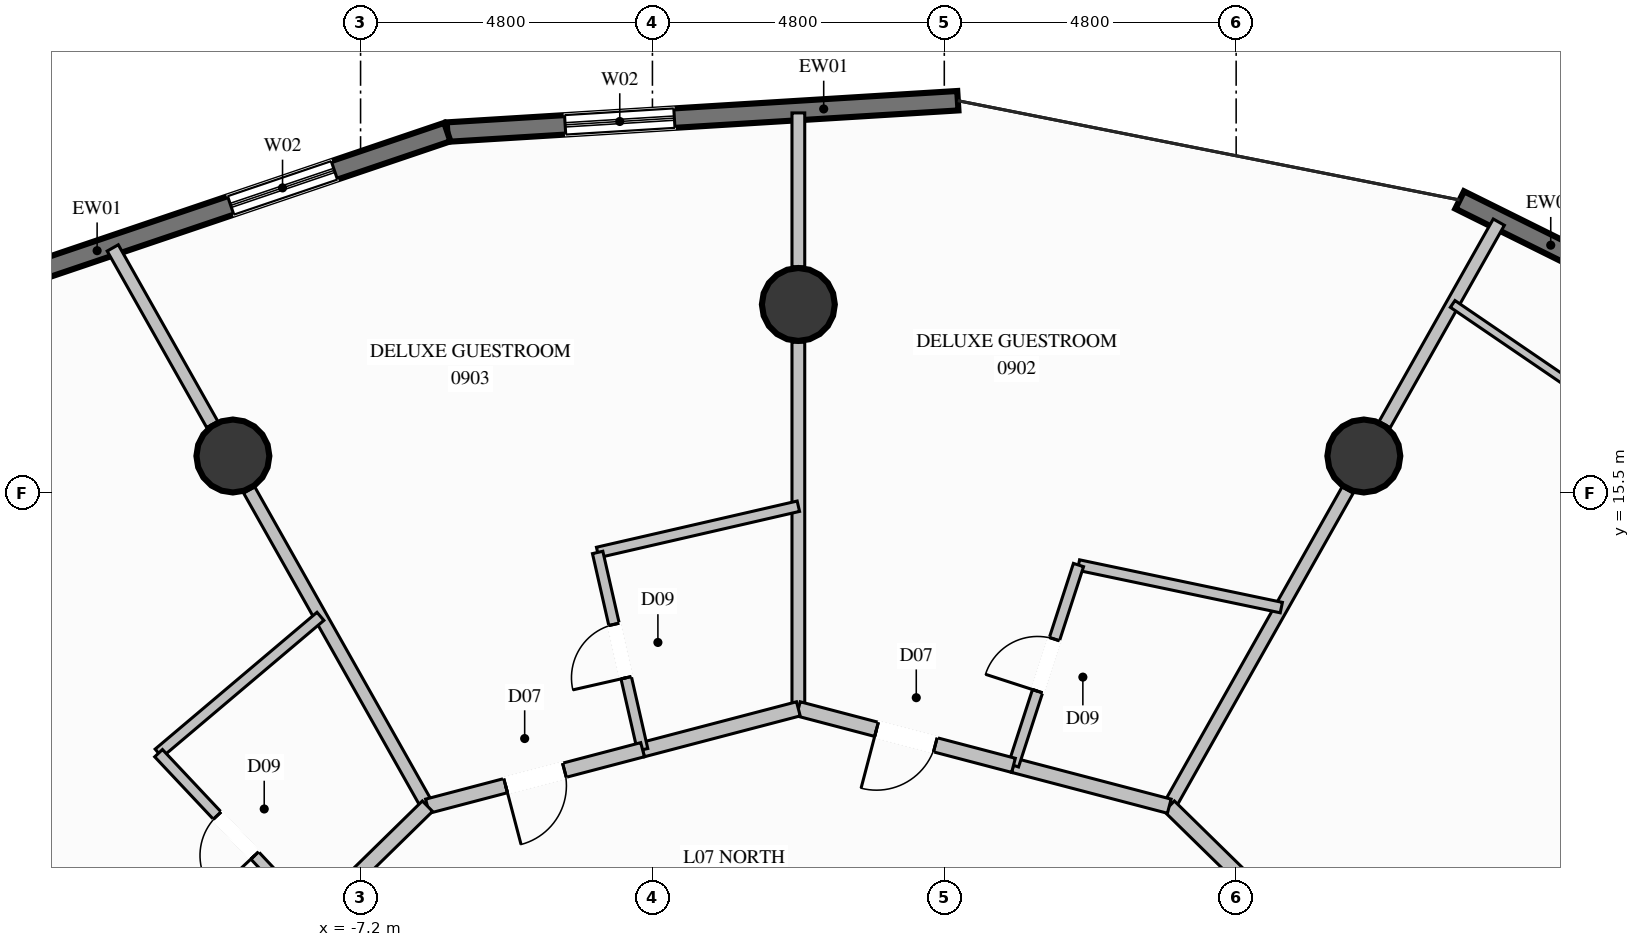
"""IFC4 building model, lengths in metres.
Left out: names, types, materials, properties, quantities, classifications, styles, units other than length and angle.
Written with IfcOpenShell. Run it as: python <this file> out.ifc"""

import sys

from ifc_helpers import new_model, si_unit, direction, frame, frame_2d, origin, origin_2d, place, context, subcontext, project, spatial, rectangle, circle, extrude, element, fill, save


model = new_model("IFC4")
c1 = context("Model", 3, precision=1e-05, world=origin(), true_north=direction((0.0, 1.0)))
c2 = subcontext(c1, "Body", "Model", "MODEL_VIEW")
j1 = project(units=[si_unit("LENGTHUNIT", "METRE"), si_unit("PLANEANGLEUNIT", "RADIAN")], contexts=[c1])
p1 = place(None, origin())
s1 = spatial("IfcSite", under=j1, at=p1, CompositionType="ELEMENT")
p2 = place(p1, origin())
s2 = spatial("IfcBuilding", under=s1, at=p2, CompositionType="ELEMENT")
p3 = place(p2, frame((0.0, 0.0, 35.6)))
s3 = spatial("IfcBuildingStorey", under=s2, at=p3, CompositionType="ELEMENT", Elevation=35.6)
for number, where, z_axis, x_axis in (
    (1, (9.3, 16.108, 0.0), (0.0, 0.0, 1.0), (1.0, 0.0, 0.0)),
    (2, (0.0, 18.6, 0.0), (0.0, 0.0, 1.0), (1.0, 0.0, 0.0)),
    (3, (-9.3, 16.108, 0.0), (0.0, 0.0, 1.0), (1.0, 0.0, 0.0)),
):
    element("IfcColumn", number, at=place(p3, frame(where, z_axis=z_axis, x_axis=x_axis)), inside=s3, PredefinedType="COLUMN", context=c2, shape_type="SweptSolid", body=[
        extrude(circle(Radius=0.6, at=origin_2d()), origin(), (0.0, 0.0, 1.0), 3.6),
    ])
p4 = place(p3, frame((10.876, 20.318, 0.0), z_axis=(0.0, 0.0, 1.0), x_axis=(0.895818759339, -0.444419565743, 0.0)))
e4 = element("IfcWall", 4, at=p4, inside=s3, PredefinedType="SOLIDWALL", context=c2, shape_type="SweptSolid", body=[
    extrude(rectangle(XDim=8.15, YDim=0.32, at=frame_2d((4.075, 0.0))), origin(), (0.0, 0.0, 1.0), 3.34),
])
p5 = place(p4, frame((3.594, 0.0, 0.35)))
e5 = element("IfcOpeningElement", 5, at=p5, cuts=e4, PredefinedType="OPENING", context=c2, shape_type="SweptSolid", body=[
    extrude(rectangle(XDim=1.8, YDim=2.6, at=frame_2d((0.9, 1.3))), frame((0.0, 0.17, 0.0), z_axis=(0.0, -1.0, 0.0), x_axis=(1.0, 0.0, 0.0)), (0.0, 0.0, 1.0), 0.34),
])
p6 = place(p3, frame((-5.773, 21.435, 0.0), z_axis=(0.0, 0.0, 1.0), x_axis=(0.998117750792, 0.06132663005, 0.0)))
e6 = element("IfcWall", 6, at=p6, inside=s3, PredefinedType="SOLIDWALL", context=c2, shape_type="SweptSolid", body=[
    extrude(rectangle(XDim=8.412, YDim=0.32, at=frame_2d((4.206, 0.0))), origin(), (0.0, 0.0, 1.0), 3.34),
])
p7 = place(p6, frame((1.941, 0.0, 0.35)))
e7 = element("IfcOpeningElement", 7, at=p7, cuts=e6, PredefinedType="OPENING", context=c2, shape_type="SweptSolid", body=[
    extrude(rectangle(XDim=1.8, YDim=2.6, at=frame_2d((0.9, 1.3))), frame((0.0, 0.17, 0.0), z_axis=(0.0, -1.0, 0.0), x_axis=(1.0, 0.0, 0.0)), (0.0, 0.0, 1.0), 0.34),
])
p8 = place(p3, frame((-13.493, 18.821, 0.0), z_axis=(0.0, 0.0, 1.0), x_axis=(0.94717495877, 0.320717317085, 0.0)))
e8 = element("IfcWall", 8, at=p8, inside=s3, PredefinedType="SOLIDWALL", context=c2, shape_type="SweptSolid", body=[
    extrude(rectangle(XDim=8.151, YDim=0.32, at=frame_2d((4.075, 0.0))), origin(), (0.0, 0.0, 1.0), 3.34),
])
p9 = place(p8, frame((4.389, 0.0, 0.35)))
e9 = element("IfcOpeningElement", 9, at=p9, cuts=e8, PredefinedType="OPENING", context=c2, shape_type="SweptSolid", body=[
    extrude(rectangle(XDim=1.8, YDim=2.6, at=frame_2d((0.9, 1.3))), frame((0.0, 0.17, 0.0), z_axis=(0.0, -1.0, 0.0), x_axis=(1.0, 0.0, 0.0)), (0.0, 0.0, 1.0), 0.34),
])
p10 = place(p3, frame((6.1, 10.349, 0.0), z_axis=(0.0, 0.0, 1.0), x_axis=(0.491458802648, 0.870900824032, 0.0)))
e10 = element("IfcWall", 10, at=p10, inside=s3, PredefinedType="PARTITIONING", context=c2, shape_type="SweptSolid", body=[
    extrude(rectangle(XDim=5.97, YDim=0.21, at=frame_2d((2.985, 0.0))), origin(), (0.0, 0.0, 1.0), 2.707),
])
p11 = place(p3, frame((9.642, 16.625, 0.0), z_axis=(0.0, 0.0, 1.0), x_axis=(0.491316217202, 0.870981271161, 0.0)))
e11 = element("IfcWall", 11, at=p11, inside=s3, PredefinedType="PARTITIONING", context=c2, shape_type="SweptSolid", body=[
    extrude(rectangle(XDim=3.822, YDim=0.21, at=frame_2d((1.911, 0.0))), origin(), (0.0, 0.0, 1.0), 3.34),
])
p12 = place(p3, frame((0.0, 11.95, 0.0), z_axis=(0.0, 0.0, 1.0), x_axis=(0.0, 1.0, 0.0)))
e12 = element("IfcWall", 12, at=p12, inside=s3, PredefinedType="PARTITIONING", context=c2, shape_type="SweptSolid", body=[
    extrude(rectangle(XDim=6.03, YDim=0.21, at=frame_2d((3.015, 0.0))), origin(), (0.0, 0.0, 1.0), 2.707),
])
p13 = place(p3, frame((0.0, 19.22, 0.0), z_axis=(0.0, 0.0, 1.0), x_axis=(0.0, 1.0, 0.0)))
e13 = element("IfcWall", 13, at=p13, inside=s3, PredefinedType="PARTITIONING", context=c2, shape_type="SweptSolid", body=[
    extrude(rectangle(XDim=2.53, YDim=0.21, at=frame_2d((1.265, 0.0))), origin(), (0.0, 0.0, 1.0), 3.34),
])
p14 = place(p3, frame((-6.1, 10.349, 0.0), z_axis=(0.0, 0.0, 1.0), x_axis=(-0.491140594116, 0.871080315936, 0.0)))
e14 = element("IfcWall", 14, at=p14, inside=s3, PredefinedType="PARTITIONING", context=c2, shape_type="SweptSolid", body=[
    extrude(rectangle(XDim=5.969, YDim=0.21, at=frame_2d((2.985, 0.0))), origin(), (0.0, 0.0, 1.0), 2.707),
])
p15 = place(p3, frame((-9.639, 16.627, 0.0), z_axis=(0.0, 0.0, 1.0), x_axis=(-0.491168715891, 0.871064459457, 0.0)))
e15 = element("IfcWall", 15, at=p15, inside=s3, PredefinedType="PARTITIONING", context=c2, shape_type="SweptSolid", body=[
    extrude(rectangle(XDim=3.333, YDim=0.21, at=frame_2d((1.667, 0.0))), origin(), (0.0, 0.0, 1.0), 3.34),
])
p16 = place(p3, frame((10.566, 5.975, 0.0), z_axis=(0.0, 0.0, 1.0), x_axis=(-0.714411174131, 0.699726142342, 0.0)))
e16 = element("IfcWall", 16, at=p16, inside=s3, PredefinedType="PARTITIONING", context=c2, shape_type="SweptSolid", body=[
    extrude(rectangle(XDim=6.251, YDim=0.24, at=frame_2d((3.125, 0.0))), origin(), (0.0, 0.0, 1.0), 3.34),
])
p17 = place(p3, frame((20.613, 11.883, 0.0), z_axis=(0.0, 0.0, 1.0), x_axis=(-0.825894658533, 0.563824452295, 0.0)))
e17 = element("IfcWall", 17, at=p17, inside=s3, PredefinedType="PARTITIONING", context=c2, shape_type="SweptSolid", body=[
    extrude(rectangle(XDim=11.929, YDim=0.135, at=frame_2d((5.964, 0.0))), origin(), (0.0, 0.0, 1.0), 3.34),
])
p18 = place(p17, frame((5.489, 0.0, 0.0)))
e18 = element("IfcOpeningElement", 18, at=p18, cuts=e17, PredefinedType="OPENING", context=c2, shape_type="SweptSolid", body=[
    extrude(rectangle(XDim=0.95, YDim=2.1, at=frame_2d((0.475, 1.05))), frame((0.0, 0.078, 0.0), z_axis=(0.0, -1.0, 0.0), x_axis=(1.0, 0.0, 0.0)), (0.0, 0.0, 1.0), 0.155),
])
p19 = place(p3, frame((6.1, 10.349, 0.0), z_axis=(0.0, 0.0, 1.0), x_axis=(-0.967291490053, 0.253667446219, 0.0)))
e19 = element("IfcWall", 19, at=p19, inside=s3, PredefinedType="PARTITIONING", context=c2, shape_type="SweptSolid", body=[
    extrude(rectangle(XDim=2.649, YDim=0.24, at=frame_2d((1.324, 0.0))), origin(), (0.0, 0.0, 1.0), 3.34),
])
p20 = place(p3, frame((7.943, 13.615, 0.0), z_axis=(0.0, 0.0, 1.0), x_axis=(-0.978691652986, 0.205335453283, 0.0)))
e20 = element("IfcWall", 20, at=p20, inside=s3, PredefinedType="PLUMBINGWALL", context=c2, shape_type="SweptSolid", body=[
    extrude(rectangle(XDim=3.409, YDim=0.175, at=frame_2d((1.705, 0.0))), origin(), (0.0, 0.0, 1.0), 3.34),
])
p21 = place(p3, frame((3.538, 11.021, 0.0), z_axis=(0.0, 0.0, 1.0), x_axis=(0.308646066056, 0.951176958251, 0.0)))
e21 = element("IfcWall", 21, at=p21, inside=s3, PredefinedType="PLUMBINGWALL", context=c2, shape_type="SweptSolid", body=[
    extrude(rectangle(XDim=3.463, YDim=0.175, at=frame_2d((1.731, 0.0))), origin(), (0.0, 0.0, 1.0), 3.34),
])
p22 = place(p21, frame((1.282, 0.0, 0.0)))
e22 = element("IfcOpeningElement", 22, at=p22, cuts=e21, PredefinedType="OPENING", context=c2, shape_type="SweptSolid", body=[
    extrude(rectangle(XDim=0.9, YDim=2.1, at=frame_2d((0.45, 1.05))), frame((0.0, 0.098, 0.0), z_axis=(0.0, -1.0, 0.0), x_axis=(1.0, 0.0, 0.0)), (0.0, 0.0, 1.0), 0.195),
])
p23 = place(p3, frame((3.538, 11.021, 0.0), z_axis=(0.0, 0.0, 1.0), x_axis=(-0.96721703222, 0.253951201187, 0.0)))
e23 = element("IfcWall", 23, at=p23, inside=s3, PredefinedType="PARTITIONING", context=c2, shape_type="SweptSolid", body=[
    extrude(rectangle(XDim=3.658, YDim=0.24, at=frame_2d((1.829, 0.0))), origin(), (0.0, 0.0, 1.0), 2.917),
])
p24 = place(p23, frame((1.329, 0.0, 0.0)))
e24 = element("IfcOpeningElement", 24, at=p24, cuts=e23, PredefinedType="OPENING", context=c2, shape_type="SweptSolid", body=[
    extrude(rectangle(XDim=1.0, YDim=2.2, at=frame_2d((0.5, 1.1))), frame((0.0, 0.13, 0.0), z_axis=(0.0, -1.0, 0.0), x_axis=(1.0, 0.0, 0.0)), (0.0, 0.0, 1.0), 0.26),
])
p25 = place(p3, frame((0.0, 11.95, 0.0), z_axis=(0.0, 0.0, 1.0), x_axis=(-0.967291490053, -0.253667446219, 0.0)))
e25 = element("IfcWall", 25, at=p25, inside=s3, PredefinedType="PARTITIONING", context=c2, shape_type="SweptSolid", body=[
    extrude(rectangle(XDim=2.649, YDim=0.24, at=frame_2d((1.324, 0.0))), origin(), (0.0, 0.0, 1.0), 2.917),
])
p26 = place(p3, frame((0.0, 15.282, 0.0), z_axis=(0.0, 0.0, 1.0), x_axis=(-0.974505253862, -0.224364681257, 0.0)))
e26 = element("IfcWall", 26, at=p26, inside=s3, PredefinedType="PLUMBINGWALL", context=c2, shape_type="SweptSolid", body=[
    extrude(rectangle(XDim=3.387, YDim=0.175, at=frame_2d((1.694, 0.0))), origin(), (0.0, 0.0, 1.0), 3.34),
])
p27 = place(p3, frame((-2.562, 11.278, 0.0), z_axis=(0.0, 0.0, 1.0), x_axis=(-0.222125372562, 0.97501811207, 0.0)))
e27 = element("IfcWall", 27, at=p27, inside=s3, PredefinedType="PLUMBINGWALL", context=c2, shape_type="SweptSolid", body=[
    extrude(rectangle(XDim=3.327, YDim=0.175, at=frame_2d((1.664, 0.0))), origin(), (0.0, 0.0, 1.0), 3.34),
])
p28 = place(p27, frame((1.214, 0.0, 0.0)))
e28 = element("IfcOpeningElement", 28, at=p28, cuts=e27, PredefinedType="OPENING", context=c2, shape_type="SweptSolid", body=[
    extrude(rectangle(XDim=0.9, YDim=2.1, at=frame_2d((0.45, 1.05))), frame((0.0, 0.098, 0.0), z_axis=(0.0, -1.0, 0.0), x_axis=(1.0, 0.0, 0.0)), (0.0, 0.0, 1.0), 0.195),
])
p29 = place(p3, frame((-2.562, 11.278, 0.0), z_axis=(0.0, 0.0, 1.0), x_axis=(-0.96721703222, -0.253951201187, 0.0)))
e29 = element("IfcWall", 29, at=p29, inside=s3, PredefinedType="PARTITIONING", context=c2, shape_type="SweptSolid", body=[
    extrude(rectangle(XDim=3.658, YDim=0.24, at=frame_2d((1.829, 0.0))), origin(), (0.0, 0.0, 1.0), 2.917),
])
p30 = place(p29, frame((1.329, 0.0, 0.0)))
e30 = element("IfcOpeningElement", 30, at=p30, cuts=e29, PredefinedType="OPENING", context=c2, shape_type="SweptSolid", body=[
    extrude(rectangle(XDim=1.0, YDim=2.2, at=frame_2d((0.5, 1.1))), frame((0.0, 0.13, 0.0), z_axis=(0.0, -1.0, 0.0), x_axis=(1.0, 0.0, 0.0)), (0.0, 0.0, 1.0), 0.26),
])
p31 = place(p3, frame((-6.1, 10.349, 0.0), z_axis=(0.0, 0.0, 1.0), x_axis=(-0.714460071513, -0.69967621527, 0.0)))
e31 = element("IfcWall", 31, at=p31, inside=s3, PredefinedType="PARTITIONING", context=c2, shape_type="SweptSolid", body=[
    extrude(rectangle(XDim=2.626, YDim=0.24, at=frame_2d((1.313, 0.0))), origin(), (0.0, 0.0, 1.0), 3.34),
])
p32 = place(p3, frame((-7.86, 13.471, 0.0), z_axis=(0.0, 0.0, 1.0), x_axis=(-0.763718302061, -0.645549653471, 0.0)))
e32 = element("IfcWall", 32, at=p32, inside=s3, PredefinedType="PLUMBINGWALL", context=c2, shape_type="SweptSolid", body=[
    extrude(rectangle(XDim=3.485, YDim=0.175, at=frame_2d((1.743, 0.0))), origin(), (0.0, 0.0, 1.0), 3.34),
])
p33 = place(p3, frame((-7.976, 8.512, 0.0), z_axis=(0.0, 0.0, 1.0), x_axis=(-0.684831906404, 0.72870107724, 0.0)))
e33 = element("IfcWall", 33, at=p33, inside=s3, PredefinedType="PLUMBINGWALL", context=c2, shape_type="SweptSolid", body=[
    extrude(rectangle(XDim=3.718, YDim=0.175, at=frame_2d((1.859, 0.0))), origin(), (0.0, 0.0, 1.0), 3.34),
])
p34 = place(p33, frame((1.409, 0.0, 0.0)))
e34 = element("IfcOpeningElement", 34, at=p34, cuts=e33, PredefinedType="OPENING", context=c2, shape_type="SweptSolid", body=[
    extrude(rectangle(XDim=0.9, YDim=2.1, at=frame_2d((0.45, 1.05))), frame((0.0, 0.098, 0.0), z_axis=(0.0, -1.0, 0.0), x_axis=(1.0, 0.0, 0.0)), (0.0, 0.0, 1.0), 0.195),
])
p35 = place(p7, origin())
e35 = element("IfcWindow", 35, at=p35, inside=s3, PartitioningType="SINGLE_PANEL", PredefinedType="WINDOW", context=c2, shape_type="SweptSolid", body=[
    extrude(rectangle(XDim=1.8, YDim=2.6, at=frame_2d((0.9, 1.3))), frame((0.0, 0.03, 0.0), z_axis=(0.0, -1.0, 0.0), x_axis=(1.0, 0.0, 0.0)), (0.0, 0.0, 1.0), 0.06),
])
fill(e7, e35)
p36 = place(p9, origin())
e36 = element("IfcWindow", 36, at=p36, inside=s3, PartitioningType="SINGLE_PANEL", PredefinedType="WINDOW", context=c2, shape_type="SweptSolid", body=[
    extrude(rectangle(XDim=1.8, YDim=2.6, at=frame_2d((0.9, 1.3))), frame((0.0, 0.03, 0.0), z_axis=(0.0, -1.0, 0.0), x_axis=(1.0, 0.0, 0.0)), (0.0, 0.0, 1.0), 0.06),
])
fill(e9, e36)
p37 = place(p22, origin())
e37 = element("IfcDoor", 37, at=p37, inside=s3, OperationType="SINGLE_SWING_LEFT", PredefinedType="DOOR", context=c2, shape_type="SweptSolid", body=[
    extrude(rectangle(XDim=0.9, YDim=2.1, at=frame_2d((0.45, 1.05))), frame((0.0, 0.025, 0.0), z_axis=(0.0, -1.0, 0.0), x_axis=(1.0, 0.0, 0.0)), (0.0, 0.0, 1.0), 0.05),
])
fill(e22, e37)
p38 = place(p24, origin())
e38 = element("IfcDoor", 38, at=p38, inside=s3, OperationType="SINGLE_SWING_RIGHT", PredefinedType="DOOR", context=c2, shape_type="SweptSolid", body=[
    extrude(rectangle(XDim=1.0, YDim=2.2, at=frame_2d((0.5, 1.1))), frame((0.0, 0.025, 0.0), z_axis=(0.0, -1.0, 0.0), x_axis=(1.0, 0.0, 0.0)), (0.0, 0.0, 1.0), 0.05),
])
fill(e24, e38)
p39 = place(p28, origin())
e39 = element("IfcDoor", 39, at=p39, inside=s3, OperationType="SINGLE_SWING_LEFT", PredefinedType="DOOR", context=c2, shape_type="SweptSolid", body=[
    extrude(rectangle(XDim=0.9, YDim=2.1, at=frame_2d((0.45, 1.05))), frame((0.0, 0.025, 0.0), z_axis=(0.0, -1.0, 0.0), x_axis=(1.0, 0.0, 0.0)), (0.0, 0.0, 1.0), 0.05),
])
fill(e28, e39)
p40 = place(p30, origin())
e40 = element("IfcDoor", 40, at=p40, inside=s3, OperationType="SINGLE_SWING_RIGHT", PredefinedType="DOOR", context=c2, shape_type="SweptSolid", body=[
    extrude(rectangle(XDim=1.0, YDim=2.2, at=frame_2d((0.5, 1.1))), frame((0.0, 0.025, 0.0), z_axis=(0.0, -1.0, 0.0), x_axis=(1.0, 0.0, 0.0)), (0.0, 0.0, 1.0), 0.05),
])
fill(e30, e40)
p41 = place(p34, origin())
e41 = element("IfcDoor", 41, at=p41, inside=s3, OperationType="SINGLE_SWING_LEFT", PredefinedType="DOOR", context=c2, shape_type="SweptSolid", body=[
    extrude(rectangle(XDim=0.9, YDim=2.1, at=frame_2d((0.45, 1.05))), frame((0.0, 0.025, 0.0), z_axis=(0.0, -1.0, 0.0), x_axis=(1.0, 0.0, 0.0)), (0.0, 0.0, 1.0), 0.05),
])
fill(e34, e41)
save(model, sys.argv[1])
